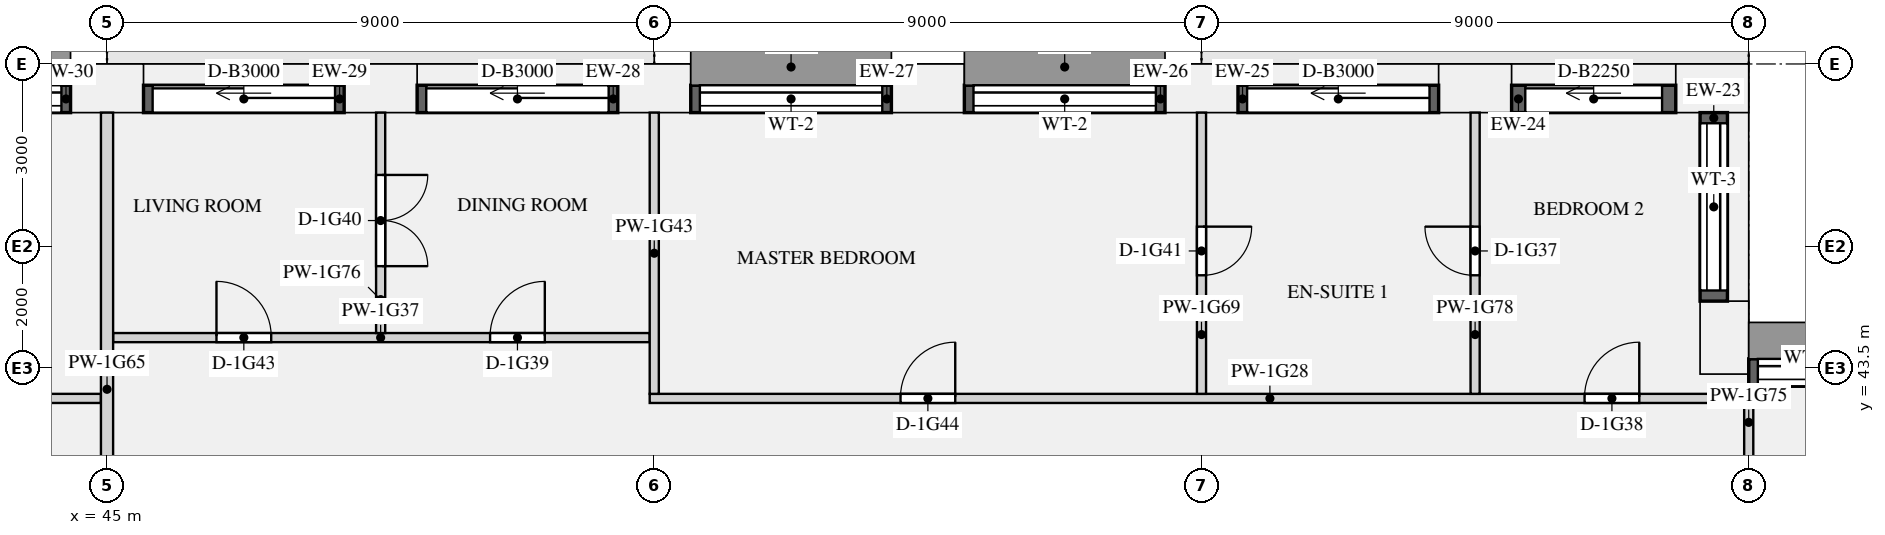
"""IFC4 building model, lengths in metres.
Left out: names, types, materials, properties, quantities, classifications, styles, units other than length and angle.
Written with IfcOpenShell. Run it as: python <this file> out.ifc"""

import sys

from ifc_helpers import new_model, si_unit, direction, frame, frame_2d, origin, origin_2d, place, context, subcontext, project, spatial, rectangle, extrude, element, fill, save


model = new_model("IFC4")
c1 = context("Model", 3, precision=1e-05, world=origin(), true_north=direction((0.0, 1.0)))
c2 = subcontext(c1, "Body", "Model", "MODEL_VIEW")
j1 = project(units=[si_unit("LENGTHUNIT", "METRE"), si_unit("PLANEANGLEUNIT", "RADIAN")], contexts=[c1])
p1 = place(None, origin())
s1 = spatial("IfcSite", under=j1, at=p1, CompositionType="ELEMENT")
p2 = place(p1, origin())
s2 = spatial("IfcBuilding", under=s1, at=p2, CompositionType="ELEMENT")
p3 = place(p2, frame((0.0, 0.0, 69.9)))
s3 = spatial("IfcBuildingStorey", under=s2, at=p3, CompositionType="ELEMENT", Elevation=69.9)
for number, where, z_axis, x_axis in (
    (1, (71.6, 44.0, 0.0), (0.0, 0.0, 1.0), (0.0, 1.0, 0.0)),
    (2, (71.4, 48.1, 0.0), (0.0, 0.0, 1.0), (-1.0, 0.0, 0.0)),
    (3, (67.5, 48.1, 0.0), (0.0, 0.0, 1.0), (-1.0, 0.0, 0.0)),
    (4, (63.0, 48.1, 0.0), (0.0, 0.0, 1.0), (-1.0, 0.0, 0.0)),
    (5, (58.5, 48.1, 0.0), (0.0, 0.0, 1.0), (-1.0, 0.0, 0.0)),
    (6, (54.0, 48.1, 0.0), (0.0, 0.0, 1.0), (-1.0, 0.0, 0.0)),
    (7, (49.5, 48.1, 0.0), (0.0, 0.0, 1.0), (-1.0, 0.0, 0.0)),
    (8, (45.0, 48.1, 0.0), (0.0, 0.0, 1.0), (-1.0, 0.0, 0.0)),
):
    element("IfcColumn", number, at=place(p3, frame(where, z_axis=z_axis, x_axis=x_axis)), inside=s3, PredefinedType="USERDEFINED", context=c2, shape_type="SweptSolid", body=[
        extrude(rectangle(XDim=1.2, YDim=0.8, at=origin_2d()), origin(), (0.0, 0.0, 1.0), 2.65),
    ])
p4 = place(p3, frame((75.3, 43.425, 0.9), z_axis=(0.0, 0.0, 1.0), x_axis=(-1.0, 0.0, 0.0)))
e9 = element("IfcWall", 9, at=p4, inside=s3, PredefinedType="SOLIDWALL", context=c2, shape_type="SweptSolid", body=[
    extrude(rectangle(XDim=3.3, YDim=0.45, at=frame_2d((1.65, 0.0))), origin(), (0.0, 0.0, 1.0), 1.75),
])
p5 = place(p4, frame((0.15, 0.0, 0.15)))
e10 = element("IfcOpeningElement", 10, at=p5, cuts=e9, PredefinedType="OPENING", context=c2, shape_type="SweptSolid", body=[
    extrude(rectangle(XDim=3.0, YDim=1.5, at=frame_2d((1.5, 0.75))), frame((0.0, 0.235, 0.0), z_axis=(0.0, -1.0, 0.0), x_axis=(1.0, 0.0, 0.0)), (0.0, 0.0, 1.0), 0.47),
])
p6 = place(p3, frame((71.425, 44.6, 0.9), z_axis=(0.0, 0.0, 1.0), x_axis=(0.0, 1.0, 0.0)))
e11 = element("IfcWall", 11, at=p6, inside=s3, PredefinedType="SOLIDWALL", context=c2, shape_type="SweptSolid", body=[
    extrude(rectangle(XDim=3.1, YDim=0.45, at=frame_2d((1.55, 0.0))), origin(), (0.0, 0.0, 1.0), 1.75),
])
p7 = place(p6, frame((0.175, 0.0, 0.15)))
e12 = element("IfcOpeningElement", 12, at=p7, cuts=e11, PredefinedType="OPENING", context=c2, shape_type="SweptSolid", body=[
    extrude(rectangle(XDim=2.75, YDim=1.5, at=frame_2d((1.375, 0.75))), frame((0.0, 0.235, 0.0), z_axis=(0.0, -1.0, 0.0), x_axis=(1.0, 0.0, 0.0)), (0.0, 0.0, 1.0), 0.47),
])
p8 = place(p3, frame((70.8, 47.925, 0.0), z_axis=(0.0, 0.0, 1.0), x_axis=(-1.0, 0.0, 0.0)))
e13 = element("IfcWall", 13, at=p8, inside=s3, PredefinedType="SOLIDWALL", context=c2, shape_type="SweptSolid", body=[
    extrude(rectangle(XDim=2.7, YDim=0.45, at=frame_2d((1.35, 0.0))), origin(), (0.0, 0.0, 1.0), 2.65),
])
p9 = place(p8, frame((0.225, 0.0, 0.0)))
e14 = element("IfcOpeningElement", 14, at=p9, cuts=e13, PredefinedType="OPENING", context=c2, shape_type="SweptSolid", body=[
    extrude(rectangle(XDim=2.25, YDim=2.3, at=frame_2d((1.125, 1.15))), frame((0.0, 0.235, 0.0), z_axis=(0.0, -1.0, 0.0), x_axis=(1.0, 0.0, 0.0)), (0.0, 0.0, 1.0), 0.47),
])
p10 = place(p3, frame((66.9, 47.925, 0.0), z_axis=(0.0, 0.0, 1.0), x_axis=(-1.0, 0.0, 0.0)))
e15 = element("IfcWall", 15, at=p10, inside=s3, PredefinedType="SOLIDWALL", context=c2, shape_type="SweptSolid", body=[
    extrude(rectangle(XDim=3.3, YDim=0.45, at=frame_2d((1.65, 0.0))), origin(), (0.0, 0.0, 1.0), 2.65),
])
p11 = place(p10, frame((0.15, 0.0, 0.0)))
e16 = element("IfcOpeningElement", 16, at=p11, cuts=e15, PredefinedType="OPENING", context=c2, shape_type="SweptSolid", body=[
    extrude(rectangle(XDim=3.0, YDim=2.3, at=frame_2d((1.5, 1.15))), frame((0.0, 0.235, 0.0), z_axis=(0.0, -1.0, 0.0), x_axis=(1.0, 0.0, 0.0)), (0.0, 0.0, 1.0), 0.47),
])
p12 = place(p3, frame((62.4, 47.925, 0.9), z_axis=(0.0, 0.0, 1.0), x_axis=(-1.0, 0.0, 0.0)))
e17 = element("IfcWall", 17, at=p12, inside=s3, PredefinedType="SOLIDWALL", context=c2, shape_type="SweptSolid", body=[
    extrude(rectangle(XDim=3.3, YDim=0.45, at=frame_2d((1.65, 0.0))), origin(), (0.0, 0.0, 1.0), 1.75),
])
p13 = place(p12, frame((0.15, 0.0, 0.15)))
e18 = element("IfcOpeningElement", 18, at=p13, cuts=e17, PredefinedType="OPENING", context=c2, shape_type="SweptSolid", body=[
    extrude(rectangle(XDim=3.0, YDim=1.5, at=frame_2d((1.5, 0.75))), frame((0.0, 0.235, 0.0), z_axis=(0.0, -1.0, 0.0), x_axis=(1.0, 0.0, 0.0)), (0.0, 0.0, 1.0), 0.47),
])
p14 = place(p3, frame((57.9, 47.925, 0.9), z_axis=(0.0, 0.0, 1.0), x_axis=(-1.0, 0.0, 0.0)))
e19 = element("IfcWall", 19, at=p14, inside=s3, PredefinedType="SOLIDWALL", context=c2, shape_type="SweptSolid", body=[
    extrude(rectangle(XDim=3.3, YDim=0.45, at=frame_2d((1.65, 0.0))), origin(), (0.0, 0.0, 1.0), 1.75),
])
p15 = place(p14, frame((0.15, 0.0, 0.15)))
e20 = element("IfcOpeningElement", 20, at=p15, cuts=e19, PredefinedType="OPENING", context=c2, shape_type="SweptSolid", body=[
    extrude(rectangle(XDim=3.0, YDim=1.5, at=frame_2d((1.5, 0.75))), frame((0.0, 0.235, 0.0), z_axis=(0.0, -1.0, 0.0), x_axis=(1.0, 0.0, 0.0)), (0.0, 0.0, 1.0), 0.47),
])
p16 = place(p3, frame((53.4, 47.925, 0.0), z_axis=(0.0, 0.0, 1.0), x_axis=(-1.0, 0.0, 0.0)))
e21 = element("IfcWall", 21, at=p16, inside=s3, PredefinedType="SOLIDWALL", context=c2, shape_type="SweptSolid", body=[
    extrude(rectangle(XDim=3.3, YDim=0.45, at=frame_2d((1.65, 0.0))), origin(), (0.0, 0.0, 1.0), 2.65),
])
p17 = place(p16, frame((0.15, 0.0, 0.0)))
e22 = element("IfcOpeningElement", 22, at=p17, cuts=e21, PredefinedType="OPENING", context=c2, shape_type="SweptSolid", body=[
    extrude(rectangle(XDim=3.0, YDim=2.3, at=frame_2d((1.5, 1.15))), frame((0.0, 0.235, 0.0), z_axis=(0.0, -1.0, 0.0), x_axis=(1.0, 0.0, 0.0)), (0.0, 0.0, 1.0), 0.47),
])
p18 = place(p3, frame((48.9, 47.925, 0.0), z_axis=(0.0, 0.0, 1.0), x_axis=(-1.0, 0.0, 0.0)))
e23 = element("IfcWall", 23, at=p18, inside=s3, PredefinedType="SOLIDWALL", context=c2, shape_type="SweptSolid", body=[
    extrude(rectangle(XDim=3.3, YDim=0.45, at=frame_2d((1.65, 0.0))), origin(), (0.0, 0.0, 1.0), 2.65),
])
p19 = place(p18, frame((0.15, 0.0, 0.0)))
e24 = element("IfcOpeningElement", 24, at=p19, cuts=e23, PredefinedType="OPENING", context=c2, shape_type="SweptSolid", body=[
    extrude(rectangle(XDim=3.0, YDim=2.3, at=frame_2d((1.5, 1.15))), frame((0.0, 0.235, 0.0), z_axis=(0.0, -1.0, 0.0), x_axis=(1.0, 0.0, 0.0)), (0.0, 0.0, 1.0), 0.47),
])
p20 = place(p3, frame((44.4, 47.925, 0.9), z_axis=(0.0, 0.0, 1.0), x_axis=(-1.0, 0.0, 0.0)))
e25 = element("IfcWall", 25, at=p20, inside=s3, PredefinedType="SOLIDWALL", context=c2, shape_type="SweptSolid", body=[
    extrude(rectangle(XDim=3.3, YDim=0.45, at=frame_2d((1.65, 0.0))), origin(), (0.0, 0.0, 1.0), 1.75),
])
p21 = place(p20, frame((0.15, 0.0, 0.15)))
e26 = element("IfcOpeningElement", 26, at=p21, cuts=e25, PredefinedType="OPENING", context=c2, shape_type="SweptSolid", body=[
    extrude(rectangle(XDim=3.0, YDim=1.5, at=frame_2d((1.5, 0.75))), frame((0.0, 0.235, 0.0), z_axis=(0.0, -1.0, 0.0), x_axis=(1.0, 0.0, 0.0)), (0.0, 0.0, 1.0), 0.47),
])
p22 = place(p3, frame((18.075, 43.0, 0.0), z_axis=(0.0, 0.0, 1.0), x_axis=(1.0, 0.0, 0.0)))
e27 = element("IfcWall", 27, at=p22, inside=s3, PredefinedType="PARTITIONING", context=c2, shape_type="SweptSolid", body=[
    extrude(rectangle(XDim=26.825, YDim=0.15, at=frame_2d((13.413, 0.0))), origin(), (0.0, 0.0, 1.0), 2.65),
])
p23 = place(p22, frame((14.925, 0.0, 0.0)))
e28 = element("IfcOpeningElement", 28, at=p23, cuts=e27, PredefinedType="OPENING", context=c2, shape_type="SweptSolid", body=[
    extrude(rectangle(XDim=1.5, YDim=2.1, at=frame_2d((0.75, 1.05))), frame((0.0, 0.085, 0.0), z_axis=(0.0, -1.0, 0.0), x_axis=(1.0, 0.0, 0.0)), (0.0, 0.0, 1.0), 0.17),
])
p24 = place(p22, frame((11.475, 0.0, 0.0)))
e29 = element("IfcOpeningElement", 29, at=p24, cuts=e27, PredefinedType="OPENING", context=c2, shape_type="SweptSolid", body=[
    extrude(rectangle(XDim=0.9, YDim=2.1, at=frame_2d((0.45, 1.05))), frame((0.0, 0.085, 0.0), z_axis=(0.0, -1.0, 0.0), x_axis=(1.0, 0.0, 0.0)), (0.0, 0.0, 1.0), 0.17),
])
p25 = place(p22, frame((2.475, 0.0, 0.0)))
e30 = element("IfcOpeningElement", 30, at=p25, cuts=e27, PredefinedType="OPENING", context=c2, shape_type="SweptSolid", body=[
    extrude(rectangle(XDim=0.9, YDim=2.1, at=frame_2d((0.45, 1.05))), frame((0.0, 0.085, 0.0), z_axis=(0.0, -1.0, 0.0), x_axis=(1.0, 0.0, 0.0)), (0.0, 0.0, 1.0), 0.17),
])
p26 = place(p22, frame((21.675, 0.0, 0.0)))
e31 = element("IfcOpeningElement", 31, at=p26, cuts=e27, PredefinedType="OPENING", context=c2, shape_type="SweptSolid", body=[
    extrude(rectangle(XDim=1.5, YDim=2.1, at=frame_2d((0.75, 1.05))), frame((0.0, 0.085, 0.0), z_axis=(0.0, -1.0, 0.0), x_axis=(1.0, 0.0, 0.0)), (0.0, 0.0, 1.0), 0.17),
])
p27 = place(p3, frame((53.925, 43.0, 0.0), z_axis=(0.0, 0.0, 1.0), x_axis=(1.0, 0.0, 0.0)))
e32 = element("IfcWall", 32, at=p27, inside=s3, PredefinedType="PARTITIONING", context=c2, shape_type="SweptSolid", body=[
    extrude(rectangle(XDim=18.0, YDim=0.15, at=frame_2d((9.0, 0.0))), origin(), (0.0, 0.0, 1.0), 2.65),
])
p28 = place(p27, frame((15.375, 0.0, 0.0)))
e33 = element("IfcOpeningElement", 33, at=p28, cuts=e32, PredefinedType="OPENING", context=c2, shape_type="SweptSolid", body=[
    extrude(rectangle(XDim=0.9, YDim=2.1, at=frame_2d((0.45, 1.05))), frame((0.0, 0.085, 0.0), z_axis=(0.0, -1.0, 0.0), x_axis=(1.0, 0.0, 0.0)), (0.0, 0.0, 1.0), 0.17),
])
p29 = place(p27, frame((4.125, 0.0, 0.0)))
e34 = element("IfcOpeningElement", 34, at=p29, cuts=e32, PredefinedType="OPENING", context=c2, shape_type="SweptSolid", body=[
    extrude(rectangle(XDim=0.9, YDim=2.1, at=frame_2d((0.45, 1.05))), frame((0.0, 0.085, 0.0), z_axis=(0.0, -1.0, 0.0), x_axis=(1.0, 0.0, 0.0)), (0.0, 0.0, 1.0), 0.17),
])
p30 = place(p3, frame((45.1, 44.0, 0.0), z_axis=(0.0, 0.0, 1.0), x_axis=(1.0, 0.0, 0.0)))
e35 = element("IfcWall", 35, at=p30, inside=s3, PredefinedType="PARTITIONING", context=c2, shape_type="SweptSolid", body=[
    extrude(rectangle(XDim=8.825, YDim=0.15, at=frame_2d((4.413, 0.0))), origin(), (0.0, 0.0, 1.0), 2.65),
])
p31 = place(p30, frame((6.2, 0.0, 0.0)))
e36 = element("IfcOpeningElement", 36, at=p31, cuts=e35, PredefinedType="OPENING", context=c2, shape_type="SweptSolid", body=[
    extrude(rectangle(XDim=0.9, YDim=2.1, at=frame_2d((0.45, 1.05))), frame((0.0, 0.085, 0.0), z_axis=(0.0, -1.0, 0.0), x_axis=(1.0, 0.0, 0.0)), (0.0, 0.0, 1.0), 0.17),
])
p32 = place(p30, frame((1.7, 0.0, 0.0)))
e37 = element("IfcOpeningElement", 37, at=p32, cuts=e35, PredefinedType="OPENING", context=c2, shape_type="SweptSolid", body=[
    extrude(rectangle(XDim=0.9, YDim=2.1, at=frame_2d((0.45, 1.05))), frame((0.0, 0.085, 0.0), z_axis=(0.0, -1.0, 0.0), x_axis=(1.0, 0.0, 0.0)), (0.0, 0.0, 1.0), 0.17),
])
p33 = place(p3, frame((54.0, 43.075, 0.0), z_axis=(0.0, 0.0, 1.0), x_axis=(0.0, 1.0, 0.0)))
e38 = element("IfcWall", 38, at=p33, inside=s3, PredefinedType="PARTITIONING", context=c2, shape_type="SweptSolid", body=[
    extrude(rectangle(XDim=4.625, YDim=0.15, at=frame_2d((2.312, 0.0))), origin(), (0.0, 0.0, 1.0), 2.65),
])
p34 = place(p3, frame((45.0, 38.6, 0.0), z_axis=(0.0, 0.0, 1.0), x_axis=(0.0, 1.0, 0.0)))
e39 = element("IfcWall", 39, at=p34, inside=s3, PredefinedType="PARTITIONING", context=c2, shape_type="SweptSolid", body=[
    extrude(rectangle(XDim=9.1, YDim=0.2, at=frame_2d((4.55, 0.0))), origin(), (0.0, 0.0, 1.0), 2.65),
])
p35 = place(p3, frame((63.0, 43.075, 0.0), z_axis=(0.0, 0.0, 1.0), x_axis=(0.0, 1.0, 0.0)))
e40 = element("IfcWall", 40, at=p35, inside=s3, PredefinedType="PARTITIONING", context=c2, shape_type="SweptSolid", body=[
    extrude(rectangle(XDim=4.625, YDim=0.15, at=frame_2d((2.312, 0.0))), origin(), (0.0, 0.0, 1.0), 2.65),
])
p36 = place(p35, frame((1.95, 0.0, 0.0)))
e41 = element("IfcOpeningElement", 41, at=p36, cuts=e40, PredefinedType="OPENING", context=c2, shape_type="SweptSolid", body=[
    extrude(rectangle(XDim=0.8, YDim=2.1, at=frame_2d((0.4, 1.05))), frame((0.0, 0.085, 0.0), z_axis=(0.0, -1.0, 0.0), x_axis=(1.0, 0.0, 0.0)), (0.0, 0.0, 1.0), 0.17),
])
p37 = place(p3, frame((72.0, 40.2, 0.0), z_axis=(0.0, 0.0, 1.0), x_axis=(0.0, 1.0, 0.0)))
e42 = element("IfcWall", 42, at=p37, inside=s3, PredefinedType="PARTITIONING", context=c2, shape_type="SweptSolid", body=[
    extrude(rectangle(XDim=3.0, YDim=0.15, at=frame_2d((1.5, 0.0))), origin(), (0.0, 0.0, 1.0), 2.65),
])
p38 = place(p37, frame((0.912, 0.0, 0.0)))
e43 = element("IfcOpeningElement", 43, at=p38, cuts=e42, PredefinedType="OPENING", context=c2, shape_type="SweptSolid", body=[
    extrude(rectangle(XDim=0.9, YDim=2.1, at=frame_2d((0.45, 1.05))), frame((0.0, 0.085, 0.0), z_axis=(0.0, -1.0, 0.0), x_axis=(1.0, 0.0, 0.0)), (0.0, 0.0, 1.0), 0.17),
])
p39 = place(p3, frame((49.5, 44.075, 0.0), z_axis=(0.0, 0.0, 1.0), x_axis=(0.0, 1.0, 0.0)))
e44 = element("IfcWall", 44, at=p39, inside=s3, PredefinedType="PARTITIONING", context=c2, shape_type="SweptSolid", body=[
    extrude(rectangle(XDim=3.625, YDim=0.15, at=frame_2d((1.812, 0.0))), origin(), (0.0, 0.0, 1.0), 2.65),
])
p40 = place(p39, frame((1.1, 0.0, 0.0)))
e45 = element("IfcOpeningElement", 45, at=p40, cuts=e44, PredefinedType="OPENING", context=c2, shape_type="SweptSolid", body=[
    extrude(rectangle(XDim=1.5, YDim=2.1, at=frame_2d((0.75, 1.05))), frame((0.0, 0.085, 0.0), z_axis=(0.0, -1.0, 0.0), x_axis=(1.0, 0.0, 0.0)), (0.0, 0.0, 1.0), 0.17),
])
p41 = place(p3, frame((67.5, 43.075, 0.0), z_axis=(0.0, 0.0, 1.0), x_axis=(0.0, 1.0, 0.0)))
e46 = element("IfcWall", 46, at=p41, inside=s3, PredefinedType="PARTITIONING", context=c2, shape_type="SweptSolid", body=[
    extrude(rectangle(XDim=4.625, YDim=0.15, at=frame_2d((2.312, 0.0))), origin(), (0.0, 0.0, 1.0), 2.65),
])
p42 = place(p41, frame((1.95, 0.0, 0.0)))
e47 = element("IfcOpeningElement", 47, at=p42, cuts=e46, PredefinedType="OPENING", context=c2, shape_type="SweptSolid", body=[
    extrude(rectangle(XDim=0.8, YDim=2.1, at=frame_2d((0.4, 1.05))), frame((0.0, 0.085, 0.0), z_axis=(0.0, -1.0, 0.0), x_axis=(1.0, 0.0, 0.0)), (0.0, 0.0, 1.0), 0.17),
])
p43 = place(p5, origin())
e48 = element("IfcWindow", 48, at=p43, inside=s3, PartitioningType="SINGLE_PANEL", PredefinedType="WINDOW", context=c2, shape_type="SweptSolid", body=[
    extrude(rectangle(XDim=3.0, YDim=1.5, at=frame_2d((1.5, 0.75))), frame((0.0, -0.065, 0.0), z_axis=(0.0, -1.0, 0.0), x_axis=(1.0, 0.0, 0.0)), (0.0, 0.0, 1.0), 0.06),
])
fill(e10, e48)
p44 = place(p7, origin())
e49 = element("IfcWindow", 49, at=p44, inside=s3, PartitioningType="SINGLE_PANEL", PredefinedType="WINDOW", context=c2, shape_type="SweptSolid", body=[
    extrude(rectangle(XDim=2.75, YDim=1.5, at=frame_2d((1.375, 0.75))), frame((0.0, -0.065, 0.0), z_axis=(0.0, -1.0, 0.0), x_axis=(1.0, 0.0, 0.0)), (0.0, 0.0, 1.0), 0.06),
])
fill(e12, e49)
p45 = place(p9, origin())
e50 = element("IfcDoor", 50, at=p45, inside=s3, OperationType="SLIDING_TO_LEFT", PredefinedType="DOOR", context=c2, shape_type="SweptSolid", body=[
    extrude(rectangle(XDim=2.25, YDim=2.3, at=frame_2d((1.125, 1.15))), frame((0.0, -0.07, 0.0), z_axis=(0.0, -1.0, 0.0), x_axis=(1.0, 0.0, 0.0)), (0.0, 0.0, 1.0), 0.05),
])
fill(e14, e50)
p46 = place(p11, origin())
e51 = element("IfcDoor", 51, at=p46, inside=s3, OperationType="SLIDING_TO_LEFT", PredefinedType="DOOR", context=c2, shape_type="SweptSolid", body=[
    extrude(rectangle(XDim=3.0, YDim=2.3, at=frame_2d((1.5, 1.15))), frame((0.0, -0.07, 0.0), z_axis=(0.0, -1.0, 0.0), x_axis=(1.0, 0.0, 0.0)), (0.0, 0.0, 1.0), 0.05),
])
fill(e16, e51)
p47 = place(p13, origin())
e52 = element("IfcWindow", 52, at=p47, inside=s3, PartitioningType="SINGLE_PANEL", PredefinedType="WINDOW", context=c2, shape_type="SweptSolid", body=[
    extrude(rectangle(XDim=3.0, YDim=1.5, at=frame_2d((1.5, 0.75))), frame((0.0, -0.065, 0.0), z_axis=(0.0, -1.0, 0.0), x_axis=(1.0, 0.0, 0.0)), (0.0, 0.0, 1.0), 0.06),
])
fill(e18, e52)
p48 = place(p15, origin())
e53 = element("IfcWindow", 53, at=p48, inside=s3, PartitioningType="SINGLE_PANEL", PredefinedType="WINDOW", context=c2, shape_type="SweptSolid", body=[
    extrude(rectangle(XDim=3.0, YDim=1.5, at=frame_2d((1.5, 0.75))), frame((0.0, -0.065, 0.0), z_axis=(0.0, -1.0, 0.0), x_axis=(1.0, 0.0, 0.0)), (0.0, 0.0, 1.0), 0.06),
])
fill(e20, e53)
p49 = place(p17, origin())
e54 = element("IfcDoor", 54, at=p49, inside=s3, OperationType="SLIDING_TO_LEFT", PredefinedType="DOOR", context=c2, shape_type="SweptSolid", body=[
    extrude(rectangle(XDim=3.0, YDim=2.3, at=frame_2d((1.5, 1.15))), frame((0.0, -0.07, 0.0), z_axis=(0.0, -1.0, 0.0), x_axis=(1.0, 0.0, 0.0)), (0.0, 0.0, 1.0), 0.05),
])
fill(e22, e54)
p50 = place(p19, origin())
e55 = element("IfcDoor", 55, at=p50, inside=s3, OperationType="SLIDING_TO_LEFT", PredefinedType="DOOR", context=c2, shape_type="SweptSolid", body=[
    extrude(rectangle(XDim=3.0, YDim=2.3, at=frame_2d((1.5, 1.15))), frame((0.0, -0.07, 0.0), z_axis=(0.0, -1.0, 0.0), x_axis=(1.0, 0.0, 0.0)), (0.0, 0.0, 1.0), 0.05),
])
fill(e24, e55)
p51 = place(p21, origin())
e56 = element("IfcWindow", 56, at=p51, inside=s3, PartitioningType="SINGLE_PANEL", PredefinedType="WINDOW", context=c2, shape_type="SweptSolid", body=[
    extrude(rectangle(XDim=3.0, YDim=1.5, at=frame_2d((1.5, 0.75))), frame((0.0, -0.065, 0.0), z_axis=(0.0, -1.0, 0.0), x_axis=(1.0, 0.0, 0.0)), (0.0, 0.0, 1.0), 0.06),
])
fill(e26, e56)
p52 = place(p42, origin())
e57 = element("IfcDoor", 57, at=p52, inside=s3, OperationType="SINGLE_SWING_RIGHT", PredefinedType="DOOR", context=c2, shape_type="SweptSolid", body=[
    extrude(rectangle(XDim=0.8, YDim=2.1, at=frame_2d((0.4, 1.05))), frame((0.0, 0.025, 0.0), z_axis=(0.0, -1.0, 0.0), x_axis=(1.0, 0.0, 0.0)), (0.0, 0.0, 1.0), 0.05),
])
fill(e47, e57)
p53 = place(p28, origin())
e58 = element("IfcDoor", 58, at=p53, inside=s3, OperationType="SINGLE_SWING_RIGHT", PredefinedType="DOOR", context=c2, shape_type="SweptSolid", body=[
    extrude(rectangle(XDim=0.9, YDim=2.1, at=frame_2d((0.45, 1.05))), frame((0.0, 0.025, 0.0), z_axis=(0.0, -1.0, 0.0), x_axis=(1.0, 0.0, 0.0)), (0.0, 0.0, 1.0), 0.05),
])
fill(e33, e58)
p54 = place(p31, origin())
e59 = element("IfcDoor", 59, at=p54, inside=s3, OperationType="SINGLE_SWING_RIGHT", PredefinedType="DOOR", context=c2, shape_type="SweptSolid", body=[
    extrude(rectangle(XDim=0.9, YDim=2.1, at=frame_2d((0.45, 1.05))), frame((0.0, 0.025, 0.0), z_axis=(0.0, -1.0, 0.0), x_axis=(1.0, 0.0, 0.0)), (0.0, 0.0, 1.0), 0.05),
])
fill(e36, e59)
p55 = place(p40, frame((1.5, 0.0, 0.0), z_axis=(0.0, 0.0, 1.0), x_axis=(-1.0, 0.0, 0.0)))
e60 = element("IfcDoor", 60, at=p55, inside=s3, OperationType="DOUBLE_DOOR_SINGLE_SWING", PredefinedType="DOOR", context=c2, shape_type="SweptSolid", body=[
    extrude(rectangle(XDim=1.5, YDim=2.1, at=frame_2d((0.75, 1.05))), frame((0.0, 0.025, 0.0), z_axis=(0.0, -1.0, 0.0), x_axis=(1.0, 0.0, 0.0)), (0.0, 0.0, 1.0), 0.05),
])
fill(e45, e60)
p56 = place(p36, frame((0.8, 0.0, 0.0), z_axis=(0.0, 0.0, 1.0), x_axis=(-1.0, 0.0, 0.0)))
e61 = element("IfcDoor", 61, at=p56, inside=s3, OperationType="SINGLE_SWING_LEFT", PredefinedType="DOOR", context=c2, shape_type="SweptSolid", body=[
    extrude(rectangle(XDim=0.8, YDim=2.1, at=frame_2d((0.4, 1.05))), frame((0.0, 0.025, 0.0), z_axis=(0.0, -1.0, 0.0), x_axis=(1.0, 0.0, 0.0)), (0.0, 0.0, 1.0), 0.05),
])
fill(e41, e61)
p57 = place(p32, origin())
e62 = element("IfcDoor", 62, at=p57, inside=s3, OperationType="SINGLE_SWING_LEFT", PredefinedType="DOOR", context=c2, shape_type="SweptSolid", body=[
    extrude(rectangle(XDim=0.9, YDim=2.1, at=frame_2d((0.45, 1.05))), frame((0.0, 0.025, 0.0), z_axis=(0.0, -1.0, 0.0), x_axis=(1.0, 0.0, 0.0)), (0.0, 0.0, 1.0), 0.05),
])
fill(e37, e62)
p58 = place(p29, origin())
e63 = element("IfcDoor", 63, at=p58, inside=s3, OperationType="SINGLE_SWING_RIGHT", PredefinedType="DOOR", context=c2, shape_type="SweptSolid", body=[
    extrude(rectangle(XDim=0.9, YDim=2.1, at=frame_2d((0.45, 1.05))), frame((0.0, 0.025, 0.0), z_axis=(0.0, -1.0, 0.0), x_axis=(1.0, 0.0, 0.0)), (0.0, 0.0, 1.0), 0.05),
])
fill(e34, e63)
save(model, sys.argv[1])
